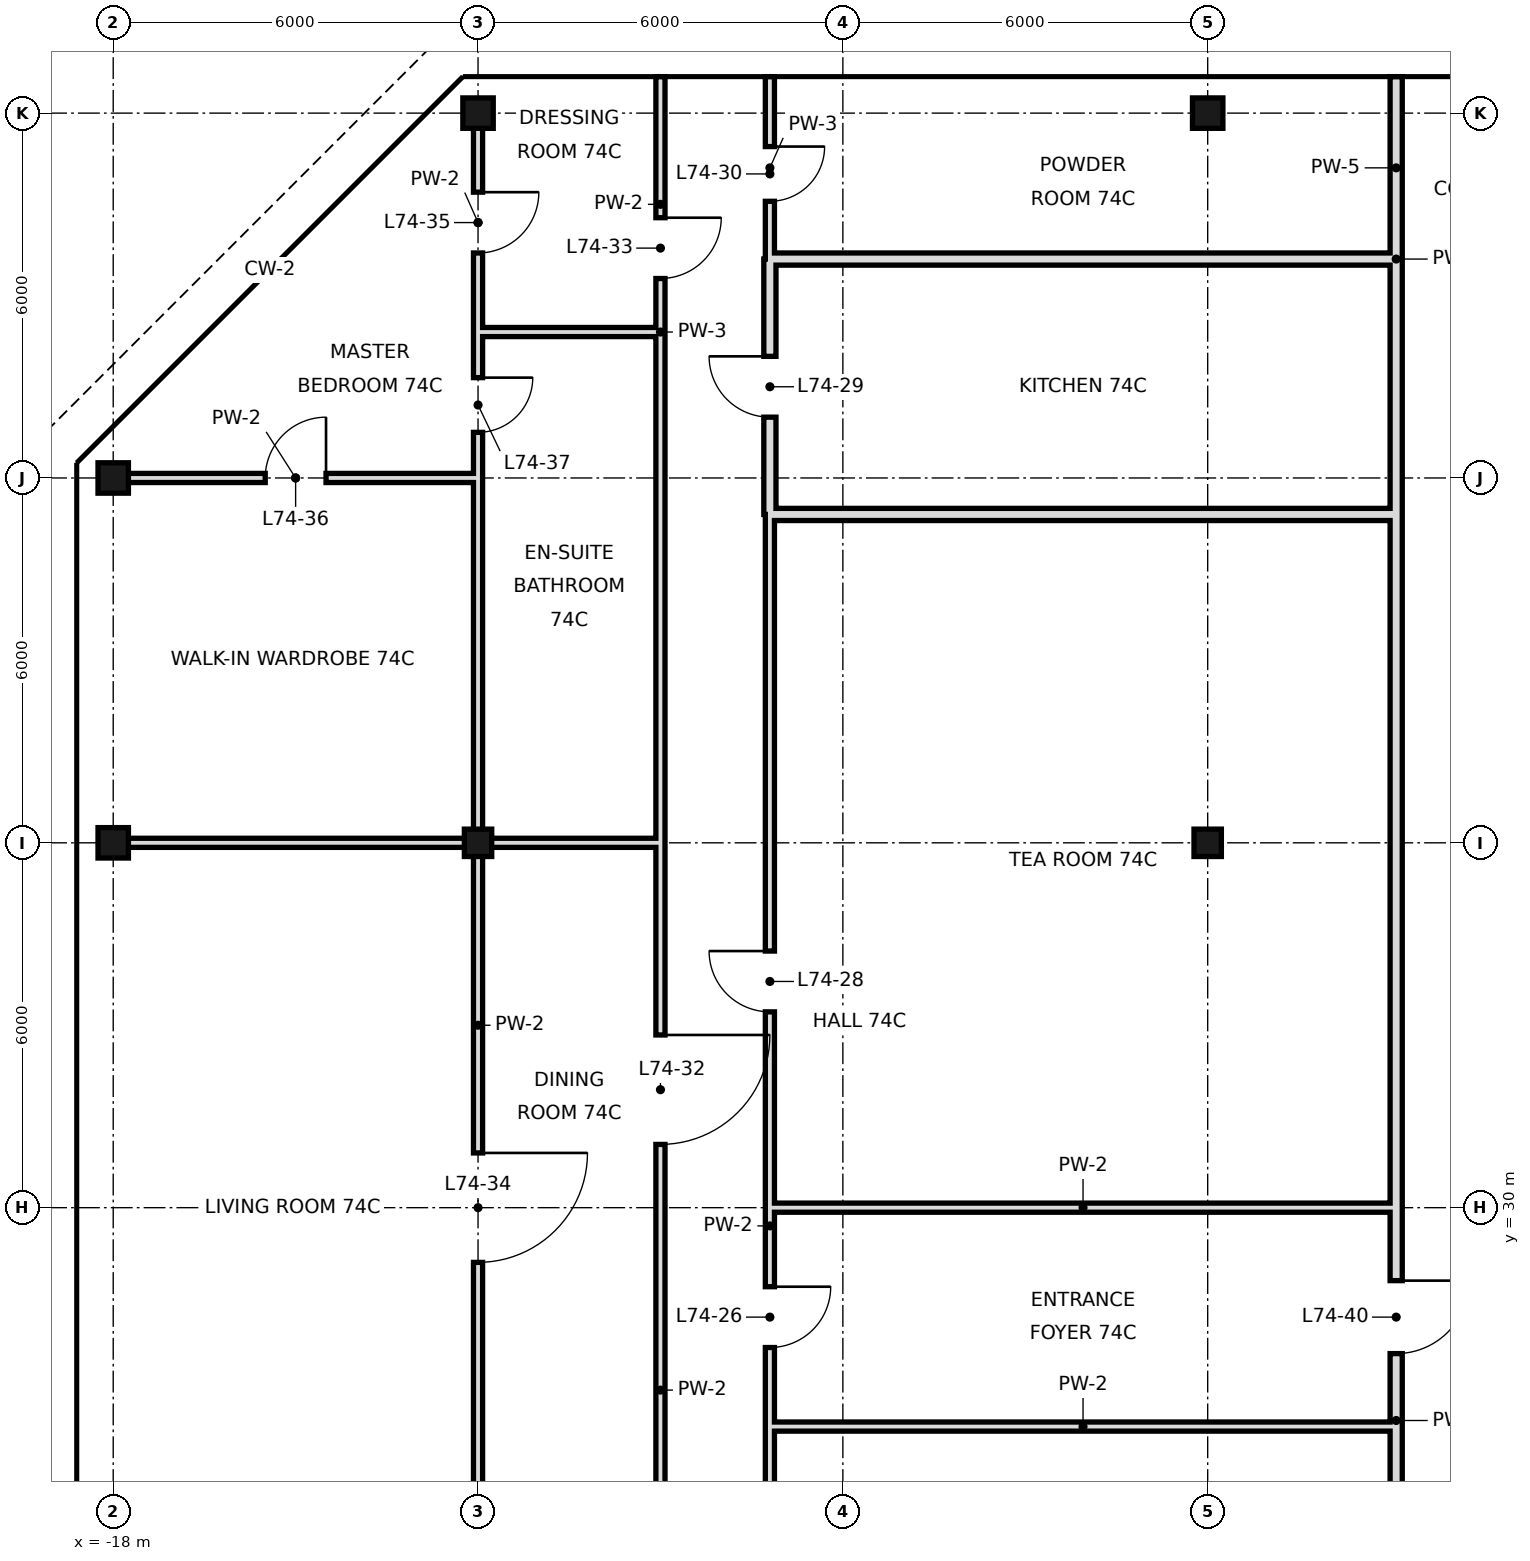
"""IFC4 building model, lengths in metres.
Left out: names, types, materials, properties, quantities, classifications, styles, units other than length and angle.
Written with IfcOpenShell. Run it as: python <this file> out.ifc"""

import sys

from ifc_helpers import new_model, si_unit, direction, frame, frame_2d, origin, origin_2d, place, context, subcontext, project, spatial, rectangle, hollow_rectangle, extrude, element, fill, save


model = new_model("IFC4")
c1 = context("Model", 3, precision=1e-05, world=origin(), true_north=direction((0.0, 1.0)))
c2 = subcontext(c1, "Body", "Model", "MODEL_VIEW")
j1 = project(units=[si_unit("LENGTHUNIT", "METRE"), si_unit("PLANEANGLEUNIT", "RADIAN")], contexts=[c1])
p1 = place(None, origin())
s1 = spatial("IfcSite", under=j1, at=p1, CompositionType="ELEMENT")
p2 = place(p1, origin())
s2 = spatial("IfcBuilding", under=s1, at=p2, CompositionType="ELEMENT")
p3 = place(p2, frame((0.0, 0.0, 312.4)))
s3 = spatial("IfcBuildingStorey", under=s2, at=p3, CompositionType="ELEMENT", Elevation=312.4)
for number, where, z_axis, x_axis in (
    (1, (-18.0, 36.0, 0.0), (0.0, 0.0, 1.0), (1.0, 0.0, 0.0)),
    (2, (-18.0, 42.0, 0.0), (0.0, 0.0, 1.0), (1.0, 0.0, 0.0)),
):
    element("IfcColumn", number, at=place(p3, frame(where, z_axis=z_axis, x_axis=x_axis)), inside=s3, PredefinedType="COLUMN", context=c2, shape_type="SweptSolid", body=[
        extrude(hollow_rectangle(XDim=0.5, YDim=0.5, WallThickness=0.025, at=origin_2d()), origin(), (0.0, 0.0, 1.0), 3.6),
    ])
p4 = place(p3, frame((-12.0, 36.0, 0.0), z_axis=(0.0, 0.0, 1.0), x_axis=(1.0, 0.0, 0.0)))
e3 = element("IfcColumn", 3, at=p4, inside=s3, PredefinedType="COLUMN", context=c2, shape_type="SweptSolid", body=[
    extrude(hollow_rectangle(XDim=0.45, YDim=0.45, WallThickness=0.022, at=origin_2d()), origin(), (0.0, 0.0, 1.0), 3.6),
])
p5 = place(p3, frame((-12.0, 48.0, 0.0), z_axis=(0.0, 0.0, 1.0), x_axis=(1.0, 0.0, 0.0)))
e4 = element("IfcColumn", 4, at=p5, inside=s3, PredefinedType="COLUMN", context=c2, shape_type="SweptSolid", body=[
    extrude(hollow_rectangle(XDim=0.5, YDim=0.5, WallThickness=0.025, at=origin_2d()), origin(), (0.0, 0.0, 1.0), 3.6),
])
p6 = place(p3, frame((0.0, 36.0, 0.0), z_axis=(0.0, 0.0, 1.0), x_axis=(1.0, 0.0, 0.0)))
e5 = element("IfcColumn", 5, at=p6, inside=s3, PredefinedType="COLUMN", context=c2, shape_type="SweptSolid", body=[
    extrude(hollow_rectangle(XDim=0.45, YDim=0.45, WallThickness=0.022, at=origin_2d()), origin(), (0.0, 0.0, 1.0), 3.6),
])
p7 = place(p3, frame((0.0, 48.0, 0.0), z_axis=(0.0, 0.0, 1.0), x_axis=(1.0, 0.0, 0.0)))
e6 = element("IfcColumn", 6, at=p7, inside=s3, PredefinedType="COLUMN", context=c2, shape_type="SweptSolid", body=[
    extrude(hollow_rectangle(XDim=0.5, YDim=0.5, WallThickness=0.025, at=origin_2d()), origin(), (0.0, 0.0, 1.0), 3.6),
])
p8 = place(p3, frame((-12.0, 24.0, 0.0), z_axis=(0.0, 0.0, 1.0), x_axis=(0.0, 1.0, 0.0)))
e7 = element("IfcWall", 7, at=p8, inside=s3, PredefinedType="PARTITIONING", context=c2, shape_type="SweptSolid", body=[
    extrude(rectangle(XDim=12.0, YDim=0.15, at=frame_2d((6.0, 0.0))), origin(), (0.0, 0.0, 1.0), 2.72),
])
p9 = place(p8, frame((5.1, 0.0, 0.0)))
e8 = element("IfcOpeningElement", 8, at=p9, cuts=e7, PredefinedType="OPENING", context=c2, shape_type="SweptSolid", body=[
    extrude(rectangle(XDim=1.8, YDim=2.4, at=frame_2d((0.9, 1.2))), frame((0.0, 0.085, 0.0), z_axis=(0.0, -1.0, 0.0), x_axis=(1.0, 0.0, 0.0)), (0.0, 0.0, 1.0), 0.17),
])
p10 = place(p3, frame((-12.0, 44.4, 0.0), z_axis=(0.0, 0.0, 1.0), x_axis=(0.0, 1.0, 0.0)))
e9 = element("IfcWall", 9, at=p10, inside=s3, PredefinedType="PARTITIONING", context=c2, shape_type="SweptSolid", body=[
    extrude(rectangle(XDim=3.6, YDim=0.15, at=frame_2d((1.8, 0.0))), origin(), (0.0, 0.0, 1.0), 2.72),
])
p11 = place(p10, frame((1.3, 0.0, 0.0)))
e10 = element("IfcOpeningElement", 10, at=p11, cuts=e9, PredefinedType="OPENING", context=c2, shape_type="SweptSolid", body=[
    extrude(rectangle(XDim=1.0, YDim=2.4, at=frame_2d((0.5, 1.2))), frame((0.0, 0.085, 0.0), z_axis=(0.0, -1.0, 0.0), x_axis=(1.0, 0.0, 0.0)), (0.0, 0.0, 1.0), 0.17),
])
p12 = place(p3, frame((-12.0, 36.0, 0.0), z_axis=(0.0, 0.0, 1.0), x_axis=(0.0, 1.0, 0.0)))
e11 = element("IfcWall", 11, at=p12, inside=s3, PredefinedType="PARTITIONING", context=c2, shape_type="SweptSolid", body=[
    extrude(rectangle(XDim=8.4, YDim=0.15, at=frame_2d((4.2, 0.0))), origin(), (0.0, 0.0, 1.0), 2.72),
])
p13 = place(p12, frame((6.75, 0.0, 0.0)))
e12 = element("IfcOpeningElement", 12, at=p13, cuts=e11, PredefinedType="OPENING", context=c2, shape_type="SweptSolid", body=[
    extrude(rectangle(XDim=0.9, YDim=2.4, at=frame_2d((0.45, 1.2))), frame((0.0, 0.085, 0.0), z_axis=(0.0, -1.0, 0.0), x_axis=(1.0, 0.0, 0.0)), (0.0, 0.0, 1.0), 0.17),
])
p14 = place(p3, frame((-7.2, 41.4, 0.0), z_axis=(0.0, 0.0, 1.0), x_axis=(0.0, 1.0, 0.0)))
e13 = element("IfcWall", 13, at=p14, inside=s3, PredefinedType="SOLIDWALL", context=c2, shape_type="SweptSolid", body=[
    extrude(rectangle(XDim=4.2, YDim=0.2, at=frame_2d((2.1, 0.0))), origin(), (0.0, 0.0, 1.0), 2.72),
])
p15 = place(p14, frame((1.6, 0.0, 0.0)))
e14 = element("IfcOpeningElement", 14, at=p15, cuts=e13, PredefinedType="OPENING", context=c2, shape_type="SweptSolid", body=[
    extrude(rectangle(XDim=1.0, YDim=2.4, at=frame_2d((0.5, 1.2))), frame((0.0, 0.11, 0.0), z_axis=(0.0, -1.0, 0.0), x_axis=(1.0, 0.0, 0.0)), (0.0, 0.0, 1.0), 0.22),
])
p16 = place(p3, frame((-7.2, 18.0, 0.0), z_axis=(0.0, 0.0, 1.0), x_axis=(0.0, 1.0, 0.0)))
e15 = element("IfcWall", 15, at=p16, inside=s3, PredefinedType="PARTITIONING", context=c2, shape_type="SweptSolid", body=[
    extrude(rectangle(XDim=23.4, YDim=0.15, at=frame_2d((11.7, 0.0))), origin(), (0.0, 0.0, 1.0), 3.42),
])
p17 = place(p16, frame((9.7, 0.0, 0.0)))
e16 = element("IfcOpeningElement", 16, at=p17, cuts=e15, PredefinedType="OPENING", context=c2, shape_type="SweptSolid", body=[
    extrude(rectangle(XDim=1.0, YDim=2.4, at=frame_2d((0.5, 1.2))), frame((0.0, 0.085, 0.0), z_axis=(0.0, -1.0, 0.0), x_axis=(1.0, 0.0, 0.0)), (0.0, 0.0, 1.0), 0.17),
])
p18 = place(p16, frame((5.08, 0.0, 0.0)))
e17 = element("IfcOpeningElement", 17, at=p18, cuts=e15, PredefinedType="OPENING", context=c2, shape_type="SweptSolid", body=[
    extrude(rectangle(XDim=1.0, YDim=2.4, at=frame_2d((0.5, 1.2))), frame((0.0, 0.085, 0.0), z_axis=(0.0, -1.0, 0.0), x_axis=(1.0, 0.0, 0.0)), (0.0, 0.0, 1.0), 0.17),
])
p19 = place(p16, frame((15.22, 0.0, 0.0)))
e18 = element("IfcOpeningElement", 18, at=p19, cuts=e15, PredefinedType="OPENING", context=c2, shape_type="SweptSolid", body=[
    extrude(rectangle(XDim=1.0, YDim=2.4, at=frame_2d((0.5, 1.2))), frame((0.0, 0.085, 0.0), z_axis=(0.0, -1.0, 0.0), x_axis=(1.0, 0.0, 0.0)), (0.0, 0.0, 1.0), 0.17),
])
p20 = place(p3, frame((-7.2, 45.6, 0.0), z_axis=(0.0, 0.0, 1.0), x_axis=(0.0, 1.0, 0.0)))
e19 = element("IfcWall", 19, at=p20, inside=s3, PredefinedType="PARTITIONING", context=c2, shape_type="SweptSolid", body=[
    extrude(rectangle(XDim=3.0, YDim=0.15, at=frame_2d((1.5, 0.0))), origin(), (0.0, 0.0, 1.0), 3.42),
])
p21 = place(p20, frame((0.95, 0.0, 0.0)))
e20 = element("IfcOpeningElement", 20, at=p21, cuts=e19, PredefinedType="OPENING", context=c2, shape_type="SweptSolid", body=[
    extrude(rectangle(XDim=0.9, YDim=2.4, at=frame_2d((0.45, 1.2))), frame((0.0, 0.085, 0.0), z_axis=(0.0, -1.0, 0.0), x_axis=(1.0, 0.0, 0.0)), (0.0, 0.0, 1.0), 0.17),
])
p22 = place(p3, frame((-9.0, 18.0, 0.0), z_axis=(0.0, 0.0, 1.0), x_axis=(0.0, 1.0, 0.0)))
e21 = element("IfcWall", 21, at=p22, inside=s3, PredefinedType="PARTITIONING", context=c2, shape_type="SweptSolid", body=[
    extrude(rectangle(XDim=18.0, YDim=0.15, at=frame_2d((9.0, 0.0))), origin(), (0.0, 0.0, 1.0), 3.42),
])
p23 = place(p22, frame((2.5, 0.0, 0.0)))
e22 = element("IfcOpeningElement", 22, at=p23, cuts=e21, PredefinedType="OPENING", context=c2, shape_type="SweptSolid", body=[
    extrude(rectangle(XDim=1.0, YDim=2.4, at=frame_2d((0.5, 1.2))), frame((0.0, 0.085, 0.0), z_axis=(0.0, -1.0, 0.0), x_axis=(1.0, 0.0, 0.0)), (0.0, 0.0, 1.0), 0.17),
])
p24 = place(p22, frame((13.04, 0.0, 0.0)))
e23 = element("IfcOpeningElement", 23, at=p24, cuts=e21, PredefinedType="OPENING", context=c2, shape_type="SweptSolid", body=[
    extrude(rectangle(XDim=1.8, YDim=2.4, at=frame_2d((0.9, 1.2))), frame((0.0, 0.085, 0.0), z_axis=(0.0, -1.0, 0.0), x_axis=(1.0, 0.0, 0.0)), (0.0, 0.0, 1.0), 0.17),
])
p25 = place(p3, frame((-9.0, 44.4, 0.0), z_axis=(0.0, 0.0, 1.0), x_axis=(0.0, 1.0, 0.0)))
e24 = element("IfcWall", 24, at=p25, inside=s3, PredefinedType="PARTITIONING", context=c2, shape_type="SweptSolid", body=[
    extrude(rectangle(XDim=4.2, YDim=0.15, at=frame_2d((2.1, 0.0))), origin(), (0.0, 0.0, 1.0), 3.42),
])
p26 = place(p25, frame((0.88, 0.0, 0.0)))
e25 = element("IfcOpeningElement", 25, at=p26, cuts=e24, PredefinedType="OPENING", context=c2, shape_type="SweptSolid", body=[
    extrude(rectangle(XDim=1.0, YDim=2.4, at=frame_2d((0.5, 1.2))), frame((0.0, 0.085, 0.0), z_axis=(0.0, -1.0, 0.0), x_axis=(1.0, 0.0, 0.0)), (0.0, 0.0, 1.0), 0.17),
])
p27 = place(p3, frame((-9.0, 36.0, 0.0), z_axis=(0.0, 0.0, 1.0), x_axis=(0.0, 1.0, 0.0)))
e26 = element("IfcWall", 26, at=p27, inside=s3, PredefinedType="PARTITIONING", context=c2, shape_type="SweptSolid", body=[
    extrude(rectangle(XDim=8.4, YDim=0.15, at=frame_2d((4.2, 0.0))), origin(), (0.0, 0.0, 1.0), 3.42),
])
p28 = place(p3, frame((3.1, 18.7, 0.0), z_axis=(0.0, 0.0, 1.0), x_axis=(0.0, 1.0, 0.0)))
e27 = element("IfcWall", 27, at=p28, inside=s3, PredefinedType="SOLIDWALL", context=c2, shape_type="SweptSolid", body=[
    extrude(rectangle(XDim=22.7, YDim=0.2, at=frame_2d((11.35, 0.0))), origin(), (0.0, 0.0, 1.0), 2.97),
])
p29 = place(p28, frame((8.9, 0.0, 0.0)))
e28 = element("IfcOpeningElement", 28, at=p29, cuts=e27, PredefinedType="OPENING", context=c2, shape_type="SweptSolid", body=[
    extrude(rectangle(XDim=1.2, YDim=2.4, at=frame_2d((0.6, 1.2))), frame((0.0, 0.11, 0.0), z_axis=(0.0, -1.0, 0.0), x_axis=(1.0, 0.0, 0.0)), (0.0, 0.0, 1.0), 0.22),
])
p30 = place(p3, frame((3.1, 45.6, 0.0), z_axis=(0.0, 0.0, 1.0), x_axis=(0.0, 1.0, 0.0)))
e29 = element("IfcWall", 29, at=p30, inside=s3, PredefinedType="SOLIDWALL", context=c2, shape_type="SweptSolid", body=[
    extrude(rectangle(XDim=3.0, YDim=0.2, at=frame_2d((1.5, 0.0))), origin(), (0.0, 0.0, 1.0), 2.72),
])
p31 = place(p3, frame((3.1, 41.4, 0.0), z_axis=(0.0, 0.0, 1.0), x_axis=(0.0, 1.0, 0.0)))
e30 = element("IfcWall", 30, at=p31, inside=s3, PredefinedType="SOLIDWALL", context=c2, shape_type="SweptSolid", body=[
    extrude(rectangle(XDim=4.2, YDim=0.2, at=frame_2d((2.1, 0.0))), origin(), (0.0, 0.0, 1.0), 2.97),
])
p32 = place(p3, frame((-7.2, 26.4, 0.0), z_axis=(0.0, 0.0, 1.0), x_axis=(1.0, 0.0, 0.0)))
e31 = element("IfcWall", 31, at=p32, inside=s3, PredefinedType="PARTITIONING", context=c2, shape_type="SweptSolid", body=[
    extrude(rectangle(XDim=10.3, YDim=0.15, at=frame_2d((5.15, 0.0))), origin(), (0.0, 0.0, 1.0), 3.42),
])
p33 = place(p3, frame((-7.2, 30.0, 0.0), z_axis=(0.0, 0.0, 1.0), x_axis=(1.0, 0.0, 0.0)))
e32 = element("IfcWall", 32, at=p33, inside=s3, PredefinedType="PARTITIONING", context=c2, shape_type="SweptSolid", body=[
    extrude(rectangle(XDim=10.3, YDim=0.15, at=frame_2d((5.15, 0.0))), origin(), (0.0, 0.0, 1.0), 2.72),
])
p34 = place(p3, frame((-18.0, 36.0, 0.0), z_axis=(0.0, 0.0, 1.0), x_axis=(1.0, 0.0, 0.0)))
e33 = element("IfcWall", 33, at=p34, inside=s3, PredefinedType="PARTITIONING", context=c2, shape_type="SweptSolid", body=[
    extrude(rectangle(XDim=6.0, YDim=0.15, at=frame_2d((3.0, 0.0))), origin(), (0.0, 0.0, 1.0), 2.97),
])
p35 = place(p3, frame((-12.0, 36.0, 0.0), z_axis=(0.0, 0.0, 1.0), x_axis=(1.0, 0.0, 0.0)))
e34 = element("IfcWall", 34, at=p35, inside=s3, PredefinedType="PARTITIONING", context=c2, shape_type="SweptSolid", body=[
    extrude(rectangle(XDim=3.0, YDim=0.15, at=frame_2d((1.5, 0.0))), origin(), (0.0, 0.0, 1.0), 2.72),
])
p36 = place(p3, frame((-7.2, 41.4, 0.0), z_axis=(0.0, 0.0, 1.0), x_axis=(1.0, 0.0, 0.0)))
e35 = element("IfcWall", 35, at=p36, inside=s3, PredefinedType="SOLIDWALL", context=c2, shape_type="SweptSolid", body=[
    extrude(rectangle(XDim=10.3, YDim=0.2, at=frame_2d((5.15, 0.0))), origin(), (0.0, 0.0, 1.0), 2.72),
])
p37 = place(p3, frame((-18.0, 42.0, 0.0), z_axis=(0.0, 0.0, 1.0), x_axis=(1.0, 0.0, 0.0)))
e36 = element("IfcWall", 36, at=p37, inside=s3, PredefinedType="PARTITIONING", context=c2, shape_type="SweptSolid", body=[
    extrude(rectangle(XDim=6.0, YDim=0.15, at=frame_2d((3.0, 0.0))), origin(), (0.0, 0.0, 1.0), 2.97),
])
p38 = place(p37, frame((2.5, 0.0, 0.0)))
e37 = element("IfcOpeningElement", 37, at=p38, cuts=e36, PredefinedType="OPENING", context=c2, shape_type="SweptSolid", body=[
    extrude(rectangle(XDim=1.0, YDim=2.4, at=frame_2d((0.5, 1.2))), frame((0.0, 0.085, 0.0), z_axis=(0.0, -1.0, 0.0), x_axis=(1.0, 0.0, 0.0)), (0.0, 0.0, 1.0), 0.17),
])
p39 = place(p3, frame((-12.0, 44.4, 0.0), z_axis=(0.0, 0.0, 1.0), x_axis=(1.0, 0.0, 0.0)))
e38 = element("IfcWall", 38, at=p39, inside=s3, PredefinedType="PARTITIONING", context=c2, shape_type="SweptSolid", body=[
    extrude(rectangle(XDim=3.0, YDim=0.15, at=frame_2d((1.5, 0.0))), origin(), (0.0, 0.0, 1.0), 3.42),
])
p40 = place(p3, frame((-7.2, 45.6, 0.0), z_axis=(0.0, 0.0, 1.0), x_axis=(1.0, 0.0, 0.0)))
e39 = element("IfcWall", 39, at=p40, inside=s3, PredefinedType="SOLIDWALL", context=c2, shape_type="SweptSolid", body=[
    extrude(rectangle(XDim=10.3, YDim=0.2, at=frame_2d((5.15, 0.0))), origin(), (0.0, 0.0, 1.0), 2.72),
])
p41 = place(p17, origin())
e40 = element("IfcDoor", 40, at=p41, inside=s3, OperationType="SINGLE_SWING_RIGHT", PredefinedType="DOOR", context=c2, shape_type="SweptSolid", body=[
    extrude(rectangle(XDim=1.0, YDim=2.4, at=frame_2d((0.5, 1.2))), frame((0.0, 0.025, 0.0), z_axis=(0.0, -1.0, 0.0), x_axis=(1.0, 0.0, 0.0)), (0.0, 0.0, 1.0), 0.05),
])
fill(e16, e40)
p42 = place(p19, frame((1.0, 0.0, 0.0), z_axis=(0.0, 0.0, 1.0), x_axis=(-1.0, 0.0, 0.0)))
e41 = element("IfcDoor", 41, at=p42, inside=s3, OperationType="SINGLE_SWING_LEFT", PredefinedType="DOOR", context=c2, shape_type="SweptSolid", body=[
    extrude(rectangle(XDim=1.0, YDim=2.4, at=frame_2d((0.5, 1.2))), frame((0.0, 0.025, 0.0), z_axis=(0.0, -1.0, 0.0), x_axis=(1.0, 0.0, 0.0)), (0.0, 0.0, 1.0), 0.05),
])
fill(e18, e41)
p43 = place(p15, frame((1.0, 0.0, 0.0), z_axis=(0.0, 0.0, 1.0), x_axis=(-1.0, 0.0, 0.0)))
e42 = element("IfcDoor", 42, at=p43, inside=s3, OperationType="SINGLE_SWING_LEFT", PredefinedType="DOOR", context=c2, shape_type="SweptSolid", body=[
    extrude(rectangle(XDim=1.0, YDim=2.4, at=frame_2d((0.5, 1.2))), frame((0.0, 0.025, 0.0), z_axis=(0.0, -1.0, 0.0), x_axis=(1.0, 0.0, 0.0)), (0.0, 0.0, 1.0), 0.05),
])
fill(e14, e42)
p44 = place(p21, origin())
e43 = element("IfcDoor", 43, at=p44, inside=s3, OperationType="SINGLE_SWING_RIGHT", PredefinedType="DOOR", context=c2, shape_type="SweptSolid", body=[
    extrude(rectangle(XDim=0.9, YDim=2.4, at=frame_2d((0.45, 1.2))), frame((0.0, 0.025, 0.0), z_axis=(0.0, -1.0, 0.0), x_axis=(1.0, 0.0, 0.0)), (0.0, 0.0, 1.0), 0.05),
])
fill(e20, e43)
p45 = place(p24, origin())
e44 = element("IfcDoor", 44, at=p45, inside=s3, OperationType="SINGLE_SWING_RIGHT", PredefinedType="DOOR", context=c2, shape_type="SweptSolid", body=[
    extrude(rectangle(XDim=1.8, YDim=2.4, at=frame_2d((0.9, 1.2))), frame((0.0, 0.025, 0.0), z_axis=(0.0, -1.0, 0.0), x_axis=(1.0, 0.0, 0.0)), (0.0, 0.0, 1.0), 0.05),
])
fill(e23, e44)
p46 = place(p26, origin())
e45 = element("IfcDoor", 45, at=p46, inside=s3, OperationType="SINGLE_SWING_RIGHT", PredefinedType="DOOR", context=c2, shape_type="SweptSolid", body=[
    extrude(rectangle(XDim=1.0, YDim=2.4, at=frame_2d((0.5, 1.2))), frame((0.0, 0.025, 0.0), z_axis=(0.0, -1.0, 0.0), x_axis=(1.0, 0.0, 0.0)), (0.0, 0.0, 1.0), 0.05),
])
fill(e25, e45)
p47 = place(p9, origin())
e46 = element("IfcDoor", 46, at=p47, inside=s3, OperationType="SINGLE_SWING_RIGHT", PredefinedType="DOOR", context=c2, shape_type="SweptSolid", body=[
    extrude(rectangle(XDim=1.8, YDim=2.4, at=frame_2d((0.9, 1.2))), frame((0.0, 0.025, 0.0), z_axis=(0.0, -1.0, 0.0), x_axis=(1.0, 0.0, 0.0)), (0.0, 0.0, 1.0), 0.05),
])
fill(e8, e46)
p48 = place(p11, origin())
e47 = element("IfcDoor", 47, at=p48, inside=s3, OperationType="SINGLE_SWING_RIGHT", PredefinedType="DOOR", context=c2, shape_type="SweptSolid", body=[
    extrude(rectangle(XDim=1.0, YDim=2.4, at=frame_2d((0.5, 1.2))), frame((0.0, 0.025, 0.0), z_axis=(0.0, -1.0, 0.0), x_axis=(1.0, 0.0, 0.0)), (0.0, 0.0, 1.0), 0.05),
])
fill(e10, e47)
p49 = place(p38, frame((1.0, 0.0, 0.0), z_axis=(0.0, 0.0, 1.0), x_axis=(-1.0, 0.0, 0.0)))
e48 = element("IfcDoor", 48, at=p49, inside=s3, OperationType="SINGLE_SWING_LEFT", PredefinedType="DOOR", context=c2, shape_type="SweptSolid", body=[
    extrude(rectangle(XDim=1.0, YDim=2.4, at=frame_2d((0.5, 1.2))), frame((0.0, 0.025, 0.0), z_axis=(0.0, -1.0, 0.0), x_axis=(1.0, 0.0, 0.0)), (0.0, 0.0, 1.0), 0.05),
])
fill(e37, e48)
p50 = place(p13, origin())
e49 = element("IfcDoor", 49, at=p50, inside=s3, OperationType="SINGLE_SWING_RIGHT", PredefinedType="DOOR", context=c2, shape_type="SweptSolid", body=[
    extrude(rectangle(XDim=0.9, YDim=2.4, at=frame_2d((0.45, 1.2))), frame((0.0, 0.025, 0.0), z_axis=(0.0, -1.0, 0.0), x_axis=(1.0, 0.0, 0.0)), (0.0, 0.0, 1.0), 0.05),
])
fill(e12, e49)
p51 = place(p29, origin())
e50 = element("IfcDoor", 50, at=p51, inside=s3, OperationType="SINGLE_SWING_RIGHT", PredefinedType="DOOR", context=c2, shape_type="SweptSolid", body=[
    extrude(rectangle(XDim=1.2, YDim=2.4, at=frame_2d((0.6, 1.2))), frame((0.0, 0.025, 0.0), z_axis=(0.0, -1.0, 0.0), x_axis=(1.0, 0.0, 0.0)), (0.0, 0.0, 1.0), 0.05),
])
fill(e28, e50)
save(model, sys.argv[1])
